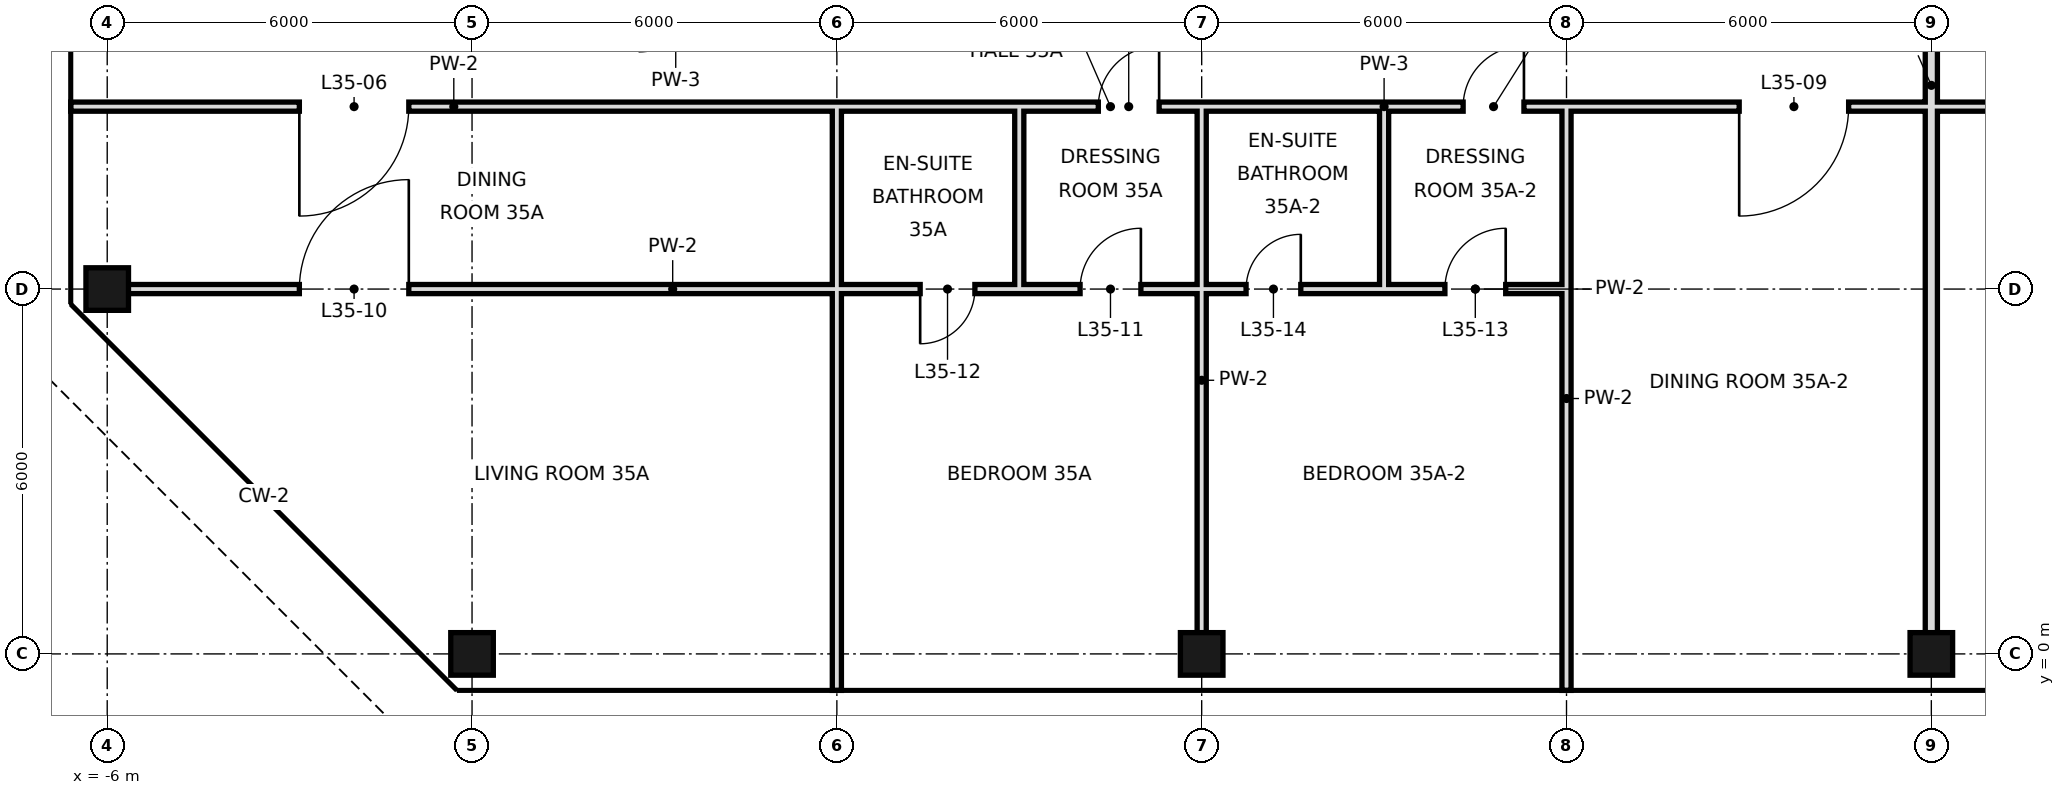
"""IFC4 building model, lengths in metres.
Left out: names, types, materials, properties, quantities, classifications, styles, units other than length and angle.
Written with IfcOpenShell. Run it as: python <this file> out.ifc"""

import sys

from ifc_helpers import new_model, si_unit, direction, frame, frame_2d, origin, origin_2d, place, context, subcontext, project, spatial, rectangle, hollow_rectangle, extrude, element, fill, save


model = new_model("IFC4")
c1 = context("Model", 3, precision=1e-05, world=origin(), true_north=direction((0.0, 1.0)))
c2 = subcontext(c1, "Body", "Model", "MODEL_VIEW")
j1 = project(units=[si_unit("LENGTHUNIT", "METRE"), si_unit("PLANEANGLEUNIT", "RADIAN")], contexts=[c1])
p1 = place(None, origin())
s1 = spatial("IfcSite", under=j1, at=p1, CompositionType="ELEMENT")
p2 = place(p1, origin())
s2 = spatial("IfcBuilding", under=s1, at=p2, CompositionType="ELEMENT")
p3 = place(p2, frame((0.0, 0.0, 154.6)))
s3 = spatial("IfcBuildingStorey", under=s2, at=p3, CompositionType="ELEMENT", Elevation=154.6)
for number, where, z_axis, x_axis in (
    (1, (-6.0, 6.0, 0.0), (0.0, 0.0, 1.0), (1.0, 0.0, 0.0)),
    (2, (0.0, 0.0, 0.0), (0.0, 0.0, 1.0), (1.0, 0.0, 0.0)),
    (3, (12.0, 0.0, 0.0), (0.0, 0.0, 1.0), (1.0, 0.0, 0.0)),
    (4, (24.0, 0.0, 0.0), (0.0, 0.0, 1.0), (1.0, 0.0, 0.0)),
):
    element("IfcColumn", number, at=place(p3, frame(where, z_axis=z_axis, x_axis=x_axis)), inside=s3, PredefinedType="COLUMN", context=c2, shape_type="SweptSolid", body=[
        extrude(hollow_rectangle(XDim=0.7, YDim=0.7, WallThickness=0.036, at=origin_2d()), origin(), (0.0, 0.0, 1.0), 3.6),
    ])
p4 = place(p3, frame((12.0, 0.0, 0.0), z_axis=(0.0, 0.0, 1.0), x_axis=(0.0, 1.0, 0.0)))
e5 = element("IfcWall", 5, at=p4, inside=s3, PredefinedType="PARTITIONING", context=c2, shape_type="SweptSolid", body=[
    extrude(rectangle(XDim=6.0, YDim=0.15, at=frame_2d((3.0, 0.0))), origin(), (0.0, 0.0, 1.0), 2.72),
])
p5 = place(p3, frame((12.0, 6.0, 0.0), z_axis=(0.0, 0.0, 1.0), x_axis=(0.0, 1.0, 0.0)))
e6 = element("IfcWall", 6, at=p5, inside=s3, PredefinedType="PARTITIONING", context=c2, shape_type="SweptSolid", body=[
    extrude(rectangle(XDim=3.0, YDim=0.15, at=frame_2d((1.5, 0.0))), origin(), (0.0, 0.0, 1.0), 2.72),
])
p6 = place(p3, frame((15.0, 6.0, 0.0), z_axis=(0.0, 0.0, 1.0), x_axis=(0.0, 1.0, 0.0)))
e7 = element("IfcWall", 7, at=p6, inside=s3, PredefinedType="PARTITIONING", context=c2, shape_type="SweptSolid", body=[
    extrude(rectangle(XDim=3.0, YDim=0.15, at=frame_2d((1.5, 0.0))), origin(), (0.0, 0.0, 1.0), 3.42),
])
p7 = place(p3, frame((18.0, -0.6, 0.0), z_axis=(0.0, 0.0, 1.0), x_axis=(0.0, 1.0, 0.0)))
e8 = element("IfcWall", 8, at=p7, inside=s3, PredefinedType="PARTITIONING", context=c2, shape_type="SweptSolid", body=[
    extrude(rectangle(XDim=9.6, YDim=0.15, at=frame_2d((4.8, 0.0))), origin(), (0.0, 0.0, 1.0), 2.72),
])
p8 = place(p3, frame((24.0, 0.0, 0.0), z_axis=(0.0, 0.0, 1.0), x_axis=(0.0, 1.0, 0.0)))
e9 = element("IfcWall", 9, at=p8, inside=s3, PredefinedType="SOLIDWALL", context=c2, shape_type="SweptSolid", body=[
    extrude(rectangle(XDim=18.7, YDim=0.2, at=frame_2d((9.35, 0.0))), origin(), (0.0, 0.0, 1.0), 2.72),
])
p9 = place(p3, frame((6.0, -0.6, 0.0), z_axis=(0.0, 0.0, 1.0), x_axis=(0.0, 1.0, 0.0)))
e10 = element("IfcWall", 10, at=p9, inside=s3, PredefinedType="PARTITIONING", context=c2, shape_type="SweptSolid", body=[
    extrude(rectangle(XDim=6.6, YDim=0.15, at=frame_2d((3.3, 0.0))), origin(), (0.0, 0.0, 1.0), 2.72),
])
p10 = place(p3, frame((6.0, 6.0, 0.0), z_axis=(0.0, 0.0, 1.0), x_axis=(0.0, 1.0, 0.0)))
e11 = element("IfcWall", 11, at=p10, inside=s3, PredefinedType="PARTITIONING", context=c2, shape_type="SweptSolid", body=[
    extrude(rectangle(XDim=3.0, YDim=0.15, at=frame_2d((1.5, 0.0))), origin(), (0.0, 0.0, 1.0), 2.72),
])
p11 = place(p3, frame((9.0, 6.0, 0.0), z_axis=(0.0, 0.0, 1.0), x_axis=(0.0, 1.0, 0.0)))
e12 = element("IfcWall", 12, at=p11, inside=s3, PredefinedType="PARTITIONING", context=c2, shape_type="SweptSolid", body=[
    extrude(rectangle(XDim=3.0, YDim=0.15, at=frame_2d((1.5, 0.0))), origin(), (0.0, 0.0, 1.0), 3.42),
])
p12 = place(p3, frame((-6.0, 6.0, 0.0), z_axis=(0.0, 0.0, 1.0), x_axis=(1.0, 0.0, 0.0)))
e13 = element("IfcWall", 13, at=p12, inside=s3, PredefinedType="PARTITIONING", context=c2, shape_type="SweptSolid", body=[
    extrude(rectangle(XDim=12.0, YDim=0.15, at=frame_2d((6.0, 0.0))), origin(), (0.0, 0.0, 1.0), 2.97),
])
p13 = place(p12, frame((3.16, 0.0, 0.0)))
e14 = element("IfcOpeningElement", 14, at=p13, cuts=e13, PredefinedType="OPENING", context=c2, shape_type="SweptSolid", body=[
    extrude(rectangle(XDim=1.8, YDim=2.4, at=frame_2d((0.9, 1.2))), frame((0.0, 0.085, 0.0), z_axis=(0.0, -1.0, 0.0), x_axis=(1.0, 0.0, 0.0)), (0.0, 0.0, 1.0), 0.17),
])
p14 = place(p3, frame((9.0, 6.0, 0.0), z_axis=(0.0, 0.0, 1.0), x_axis=(1.0, 0.0, 0.0)))
e15 = element("IfcWall", 15, at=p14, inside=s3, PredefinedType="PARTITIONING", context=c2, shape_type="SweptSolid", body=[
    extrude(rectangle(XDim=3.0, YDim=0.15, at=frame_2d((1.5, 0.0))), origin(), (0.0, 0.0, 1.0), 2.97),
])
p15 = place(p14, frame((1.0, 0.0, 0.0)))
e16 = element("IfcOpeningElement", 16, at=p15, cuts=e15, PredefinedType="OPENING", context=c2, shape_type="SweptSolid", body=[
    extrude(rectangle(XDim=1.0, YDim=2.4, at=frame_2d((0.5, 1.2))), frame((0.0, 0.085, 0.0), z_axis=(0.0, -1.0, 0.0), x_axis=(1.0, 0.0, 0.0)), (0.0, 0.0, 1.0), 0.17),
])
p16 = place(p3, frame((15.0, 6.0, 0.0), z_axis=(0.0, 0.0, 1.0), x_axis=(1.0, 0.0, 0.0)))
e17 = element("IfcWall", 17, at=p16, inside=s3, PredefinedType="PARTITIONING", context=c2, shape_type="SweptSolid", body=[
    extrude(rectangle(XDim=3.0, YDim=0.15, at=frame_2d((1.5, 0.0))), origin(), (0.0, 0.0, 1.0), 2.97),
])
p17 = place(p16, frame((1.0, 0.0, 0.0)))
e18 = element("IfcOpeningElement", 18, at=p17, cuts=e17, PredefinedType="OPENING", context=c2, shape_type="SweptSolid", body=[
    extrude(rectangle(XDim=1.0, YDim=2.4, at=frame_2d((0.5, 1.2))), frame((0.0, 0.085, 0.0), z_axis=(0.0, -1.0, 0.0), x_axis=(1.0, 0.0, 0.0)), (0.0, 0.0, 1.0), 0.17),
])
p18 = place(p3, frame((6.0, 6.0, 0.0), z_axis=(0.0, 0.0, 1.0), x_axis=(1.0, 0.0, 0.0)))
e19 = element("IfcWall", 19, at=p18, inside=s3, PredefinedType="PARTITIONING", context=c2, shape_type="SweptSolid", body=[
    extrude(rectangle(XDim=3.0, YDim=0.15, at=frame_2d((1.5, 0.0))), origin(), (0.0, 0.0, 1.0), 2.97),
])
p19 = place(p18, frame((1.37, 0.0, 0.0)))
e20 = element("IfcOpeningElement", 20, at=p19, cuts=e19, PredefinedType="OPENING", context=c2, shape_type="SweptSolid", body=[
    extrude(rectangle(XDim=0.9, YDim=2.4, at=frame_2d((0.45, 1.2))), frame((0.0, 0.085, 0.0), z_axis=(0.0, -1.0, 0.0), x_axis=(1.0, 0.0, 0.0)), (0.0, 0.0, 1.0), 0.17),
])
p20 = place(p3, frame((12.0, 6.0, 0.0), z_axis=(0.0, 0.0, 1.0), x_axis=(1.0, 0.0, 0.0)))
e21 = element("IfcWall", 21, at=p20, inside=s3, PredefinedType="PARTITIONING", context=c2, shape_type="SweptSolid", body=[
    extrude(rectangle(XDim=3.0, YDim=0.15, at=frame_2d((1.5, 0.0))), origin(), (0.0, 0.0, 1.0), 2.97),
])
p21 = place(p20, frame((0.73, 0.0, 0.0)))
e22 = element("IfcOpeningElement", 22, at=p21, cuts=e21, PredefinedType="OPENING", context=c2, shape_type="SweptSolid", body=[
    extrude(rectangle(XDim=0.9, YDim=2.4, at=frame_2d((0.45, 1.2))), frame((0.0, 0.085, 0.0), z_axis=(0.0, -1.0, 0.0), x_axis=(1.0, 0.0, 0.0)), (0.0, 0.0, 1.0), 0.17),
])
p22 = place(p3, frame((-6.6, 9.0, 0.0), z_axis=(0.0, 0.0, 1.0), x_axis=(1.0, 0.0, 0.0)))
e23 = element("IfcWall", 23, at=p22, inside=s3, PredefinedType="PARTITIONING", context=c2, shape_type="SweptSolid", body=[
    extrude(rectangle(XDim=12.6, YDim=0.15, at=frame_2d((6.3, 0.0))), origin(), (0.0, 0.0, 1.0), 3.42),
])
p23 = place(p22, frame((3.76, 0.0, 0.0)))
e24 = element("IfcOpeningElement", 24, at=p23, cuts=e23, PredefinedType="OPENING", context=c2, shape_type="SweptSolid", body=[
    extrude(rectangle(XDim=1.8, YDim=2.4, at=frame_2d((0.9, 1.2))), frame((0.0, 0.085, 0.0), z_axis=(0.0, -1.0, 0.0), x_axis=(1.0, 0.0, 0.0)), (0.0, 0.0, 1.0), 0.17),
])
p24 = place(p3, frame((9.0, 9.0, 0.0), z_axis=(0.0, 0.0, 1.0), x_axis=(1.0, 0.0, 0.0)))
e25 = element("IfcWall", 25, at=p24, inside=s3, PredefinedType="PARTITIONING", context=c2, shape_type="SweptSolid", body=[
    extrude(rectangle(XDim=3.0, YDim=0.15, at=frame_2d((1.5, 0.0))), origin(), (0.0, 0.0, 1.0), 3.42),
])
p25 = place(p24, frame((1.3, 0.0, 0.0)))
e26 = element("IfcOpeningElement", 26, at=p25, cuts=e25, PredefinedType="OPENING", context=c2, shape_type="SweptSolid", body=[
    extrude(rectangle(XDim=1.0, YDim=2.4, at=frame_2d((0.5, 1.2))), frame((0.0, 0.085, 0.0), z_axis=(0.0, -1.0, 0.0), x_axis=(1.0, 0.0, 0.0)), (0.0, 0.0, 1.0), 0.17),
])
p26 = place(p3, frame((15.0, 9.0, 0.0), z_axis=(0.0, 0.0, 1.0), x_axis=(1.0, 0.0, 0.0)))
e27 = element("IfcWall", 27, at=p26, inside=s3, PredefinedType="PARTITIONING", context=c2, shape_type="SweptSolid", body=[
    extrude(rectangle(XDim=24.6, YDim=0.15, at=frame_2d((12.3, 0.0))), origin(), (0.0, 0.0, 1.0), 3.42),
])
p27 = place(p26, frame((1.3, 0.0, 0.0)))
e28 = element("IfcOpeningElement", 28, at=p27, cuts=e27, PredefinedType="OPENING", context=c2, shape_type="SweptSolid", body=[
    extrude(rectangle(XDim=1.0, YDim=2.4, at=frame_2d((0.5, 1.2))), frame((0.0, 0.085, 0.0), z_axis=(0.0, -1.0, 0.0), x_axis=(1.0, 0.0, 0.0)), (0.0, 0.0, 1.0), 0.17),
])
p28 = place(p26, frame((5.84, 0.0, 0.0)))
e29 = element("IfcOpeningElement", 29, at=p28, cuts=e27, PredefinedType="OPENING", context=c2, shape_type="SweptSolid", body=[
    extrude(rectangle(XDim=1.8, YDim=2.4, at=frame_2d((0.9, 1.2))), frame((0.0, 0.085, 0.0), z_axis=(0.0, -1.0, 0.0), x_axis=(1.0, 0.0, 0.0)), (0.0, 0.0, 1.0), 0.17),
])
p29 = place(p26, frame((10.6, 0.0, 0.0)))
e30 = element("IfcOpeningElement", 30, at=p29, cuts=e27, PredefinedType="OPENING", context=c2, shape_type="SweptSolid", body=[
    extrude(rectangle(XDim=1.0, YDim=2.4, at=frame_2d((0.5, 1.2))), frame((0.0, 0.085, 0.0), z_axis=(0.0, -1.0, 0.0), x_axis=(1.0, 0.0, 0.0)), (0.0, 0.0, 1.0), 0.17),
])
p30 = place(p26, frame((16.6, 0.0, 0.0)))
e31 = element("IfcOpeningElement", 31, at=p30, cuts=e27, PredefinedType="OPENING", context=c2, shape_type="SweptSolid", body=[
    extrude(rectangle(XDim=1.0, YDim=2.4, at=frame_2d((0.5, 1.2))), frame((0.0, 0.085, 0.0), z_axis=(0.0, -1.0, 0.0), x_axis=(1.0, 0.0, 0.0)), (0.0, 0.0, 1.0), 0.17),
])
p31 = place(p26, frame((22.72, 0.0, 0.0)))
e32 = element("IfcOpeningElement", 32, at=p31, cuts=e27, PredefinedType="OPENING", context=c2, shape_type="SweptSolid", body=[
    extrude(rectangle(XDim=1.0, YDim=2.4, at=frame_2d((0.5, 1.2))), frame((0.0, 0.085, 0.0), z_axis=(0.0, -1.0, 0.0), x_axis=(1.0, 0.0, 0.0)), (0.0, 0.0, 1.0), 0.17),
])
for number, where, z_axis, x_axis in (
    (33, (6.0, 9.0, 0.0), (0.0, 0.0, 1.0), (1.0, 0.0, 0.0)),
    (34, (12.0, 9.0, 0.0), (0.0, 0.0, 1.0), (1.0, 0.0, 0.0)),
):
    element("IfcWall", number, at=place(p3, frame(where, z_axis=z_axis, x_axis=x_axis)), inside=s3, PredefinedType="PARTITIONING", context=c2, shape_type="SweptSolid", body=[
        extrude(rectangle(XDim=3.0, YDim=0.15, at=frame_2d((1.5, 0.0))), origin(), (0.0, 0.0, 1.0), 3.42),
    ])
p32 = place(p23, frame((1.8, 0.0, 0.0), z_axis=(0.0, 0.0, 1.0), x_axis=(-1.0, 0.0, 0.0)))
e35 = element("IfcDoor", 35, at=p32, inside=s3, OperationType="SINGLE_SWING_RIGHT", PredefinedType="DOOR", context=c2, shape_type="SweptSolid", body=[
    extrude(rectangle(XDim=1.8, YDim=2.4, at=frame_2d((0.9, 1.2))), frame((0.0, 0.025, 0.0), z_axis=(0.0, -1.0, 0.0), x_axis=(1.0, 0.0, 0.0)), (0.0, 0.0, 1.0), 0.05),
])
fill(e24, e35)
p33 = place(p25, frame((1.0, 0.0, 0.0), z_axis=(0.0, 0.0, 1.0), x_axis=(-1.0, 0.0, 0.0)))
e36 = element("IfcDoor", 36, at=p33, inside=s3, OperationType="SINGLE_SWING_LEFT", PredefinedType="DOOR", context=c2, shape_type="SweptSolid", body=[
    extrude(rectangle(XDim=1.0, YDim=2.4, at=frame_2d((0.5, 1.2))), frame((0.0, 0.025, 0.0), z_axis=(0.0, -1.0, 0.0), x_axis=(1.0, 0.0, 0.0)), (0.0, 0.0, 1.0), 0.05),
])
fill(e26, e36)
p34 = place(p27, frame((1.0, 0.0, 0.0), z_axis=(0.0, 0.0, 1.0), x_axis=(-1.0, 0.0, 0.0)))
e37 = element("IfcDoor", 37, at=p34, inside=s3, OperationType="SINGLE_SWING_LEFT", PredefinedType="DOOR", context=c2, shape_type="SweptSolid", body=[
    extrude(rectangle(XDim=1.0, YDim=2.4, at=frame_2d((0.5, 1.2))), frame((0.0, 0.025, 0.0), z_axis=(0.0, -1.0, 0.0), x_axis=(1.0, 0.0, 0.0)), (0.0, 0.0, 1.0), 0.05),
])
fill(e28, e37)
p35 = place(p28, frame((1.8, 0.0, 0.0), z_axis=(0.0, 0.0, 1.0), x_axis=(-1.0, 0.0, 0.0)))
e38 = element("IfcDoor", 38, at=p35, inside=s3, OperationType="SINGLE_SWING_RIGHT", PredefinedType="DOOR", context=c2, shape_type="SweptSolid", body=[
    extrude(rectangle(XDim=1.8, YDim=2.4, at=frame_2d((0.9, 1.2))), frame((0.0, 0.025, 0.0), z_axis=(0.0, -1.0, 0.0), x_axis=(1.0, 0.0, 0.0)), (0.0, 0.0, 1.0), 0.05),
])
fill(e29, e38)
p36 = place(p13, frame((1.8, 0.0, 0.0), z_axis=(0.0, 0.0, 1.0), x_axis=(-1.0, 0.0, 0.0)))
e39 = element("IfcDoor", 39, at=p36, inside=s3, OperationType="SINGLE_SWING_LEFT", PredefinedType="DOOR", context=c2, shape_type="SweptSolid", body=[
    extrude(rectangle(XDim=1.8, YDim=2.4, at=frame_2d((0.9, 1.2))), frame((0.0, 0.025, 0.0), z_axis=(0.0, -1.0, 0.0), x_axis=(1.0, 0.0, 0.0)), (0.0, 0.0, 1.0), 0.05),
])
fill(e14, e39)
p37 = place(p15, frame((1.0, 0.0, 0.0), z_axis=(0.0, 0.0, 1.0), x_axis=(-1.0, 0.0, 0.0)))
e40 = element("IfcDoor", 40, at=p37, inside=s3, OperationType="SINGLE_SWING_LEFT", PredefinedType="DOOR", context=c2, shape_type="SweptSolid", body=[
    extrude(rectangle(XDim=1.0, YDim=2.4, at=frame_2d((0.5, 1.2))), frame((0.0, 0.025, 0.0), z_axis=(0.0, -1.0, 0.0), x_axis=(1.0, 0.0, 0.0)), (0.0, 0.0, 1.0), 0.05),
])
fill(e16, e40)
p38 = place(p19, frame((0.9, 0.0, 0.0), z_axis=(0.0, 0.0, 1.0), x_axis=(-1.0, 0.0, 0.0)))
e41 = element("IfcDoor", 41, at=p38, inside=s3, OperationType="SINGLE_SWING_RIGHT", PredefinedType="DOOR", context=c2, shape_type="SweptSolid", body=[
    extrude(rectangle(XDim=0.9, YDim=2.4, at=frame_2d((0.45, 1.2))), frame((0.0, 0.025, 0.0), z_axis=(0.0, -1.0, 0.0), x_axis=(1.0, 0.0, 0.0)), (0.0, 0.0, 1.0), 0.05),
])
fill(e20, e41)
p39 = place(p17, frame((1.0, 0.0, 0.0), z_axis=(0.0, 0.0, 1.0), x_axis=(-1.0, 0.0, 0.0)))
e42 = element("IfcDoor", 42, at=p39, inside=s3, OperationType="SINGLE_SWING_LEFT", PredefinedType="DOOR", context=c2, shape_type="SweptSolid", body=[
    extrude(rectangle(XDim=1.0, YDim=2.4, at=frame_2d((0.5, 1.2))), frame((0.0, 0.025, 0.0), z_axis=(0.0, -1.0, 0.0), x_axis=(1.0, 0.0, 0.0)), (0.0, 0.0, 1.0), 0.05),
])
fill(e18, e42)
p40 = place(p21, frame((0.9, 0.0, 0.0), z_axis=(0.0, 0.0, 1.0), x_axis=(-1.0, 0.0, 0.0)))
e43 = element("IfcDoor", 43, at=p40, inside=s3, OperationType="SINGLE_SWING_LEFT", PredefinedType="DOOR", context=c2, shape_type="SweptSolid", body=[
    extrude(rectangle(XDim=0.9, YDim=2.4, at=frame_2d((0.45, 1.2))), frame((0.0, 0.025, 0.0), z_axis=(0.0, -1.0, 0.0), x_axis=(1.0, 0.0, 0.0)), (0.0, 0.0, 1.0), 0.05),
])
fill(e22, e43)
save(model, sys.argv[1])
